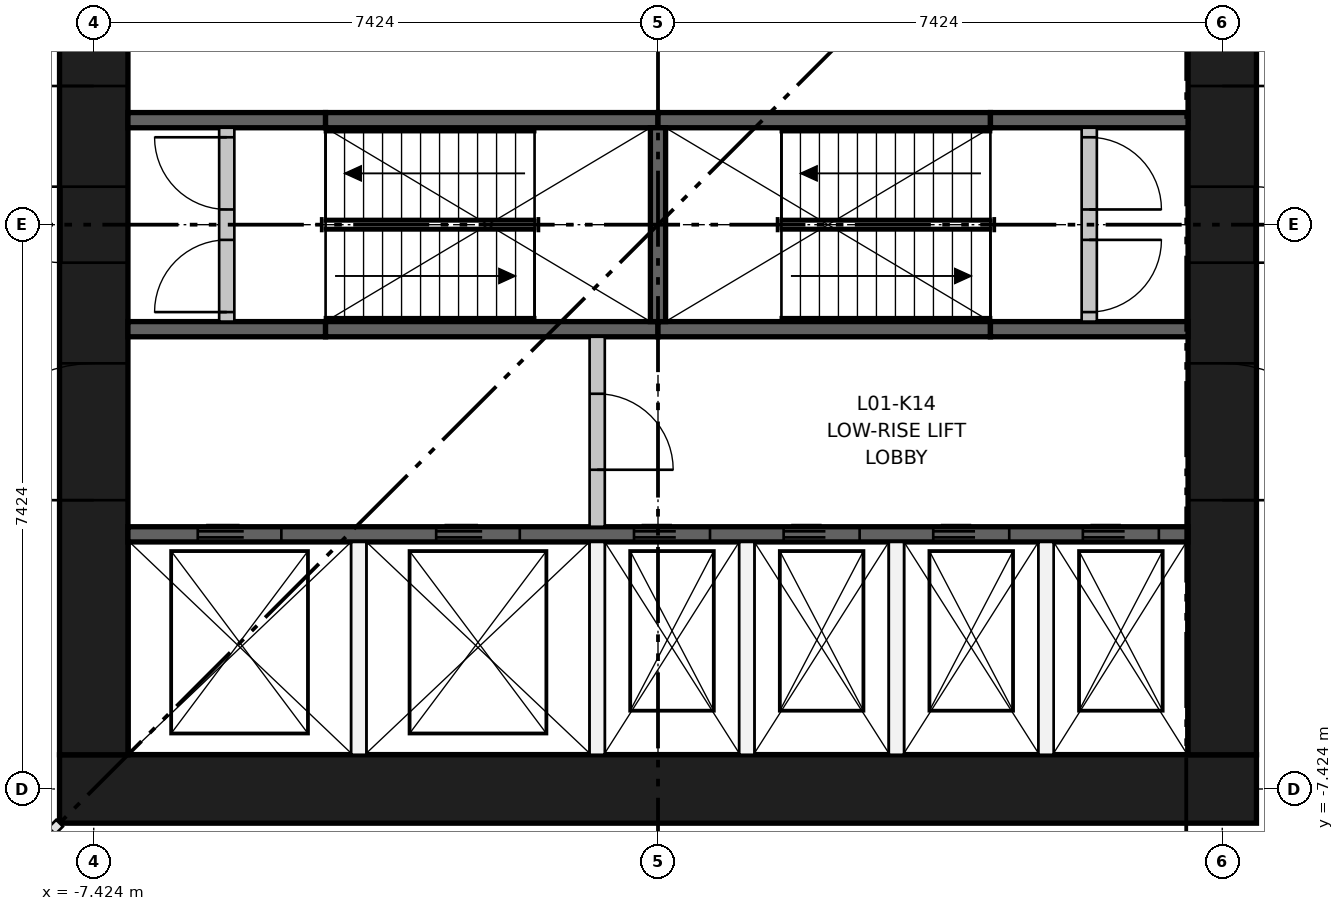
"""IFC4 building model, lengths in metres.
Left out: names, types, materials, properties, quantities, classifications, styles, units other than length and angle.
Written with IfcOpenShell. Run it as: python <this file> out.ifc"""

import sys

from ifc_helpers import new_model, si_unit, direction, frame, frame_2d, origin, place, context, subcontext, project, spatial, rectangle, extrude, element, fill, save


model = new_model("IFC4")
c1 = context("Model", 3, precision=1e-05, world=origin(), true_north=direction((0.0, 1.0)))
c2 = subcontext(c1, "Body", "Model", "MODEL_VIEW")
j1 = project(units=[si_unit("LENGTHUNIT", "METRE"), si_unit("PLANEANGLEUNIT", "RADIAN")], contexts=[c1])
p1 = place(None, origin())
s1 = spatial("IfcSite", under=j1, at=p1, CompositionType="ELEMENT")
p2 = place(p1, origin())
s2 = spatial("IfcBuilding", under=s1, at=p2, CompositionType="ELEMENT")
p3 = place(p2, frame((0.0, 0.0, 5.2)))
s3 = spatial("IfcBuildingStorey", under=s2, at=p3, CompositionType="ELEMENT", Elevation=5.2)
p4 = place(p3, frame((-7.874, -7.424, 0.0), z_axis=(0.0, 0.0, 1.0), x_axis=(1.0, 0.0, 0.0)))
e1 = element("IfcWall", 1, at=p4, inside=s3, PredefinedType="SHEAR", context=c2, shape_type="SweptSolid", body=[
    extrude(rectangle(XDim=15.748, YDim=0.9, at=frame_2d((7.874, 0.0))), origin(), (0.0, 0.0, 1.0), 4.7),
])
p5 = place(p3, frame((-7.424, -6.974, 0.0), z_axis=(0.0, 0.0, 1.0), x_axis=(0.0, 1.0, 0.0)))
e2 = element("IfcWall", 2, at=p5, inside=s3, PredefinedType="SHEAR", context=c2, shape_type="SweptSolid", body=[
    extrude(rectangle(XDim=13.948, YDim=0.9, at=frame_2d((6.974, 0.0))), origin(), (0.0, 0.0, 1.0), 4.7),
])
p6 = place(p5, frame((6.474, 0.0, 0.0)))
e3 = element("IfcOpeningElement", 3, at=p6, cuts=e2, PredefinedType="OPENING", context=c2, shape_type="SweptSolid", body=[
    extrude(rectangle(XDim=1.0, YDim=2.1, at=frame_2d((0.5, 1.05))), frame((0.0, 0.46, 0.0), z_axis=(0.0, -1.0, 0.0), x_axis=(1.0, 0.0, 0.0)), (0.0, 0.0, 1.0), 0.92),
])
p7 = place(p5, frame((3.35, 0.0, 0.0)))
e4 = element("IfcOpeningElement", 4, at=p7, cuts=e2, PredefinedType="OPENING", context=c2, shape_type="SweptSolid", body=[
    extrude(rectangle(XDim=1.8, YDim=2.1, at=frame_2d((0.9, 1.05))), frame((0.0, 0.46, 0.0), z_axis=(0.0, -1.0, 0.0), x_axis=(1.0, 0.0, 0.0)), (0.0, 0.0, 1.0), 0.92),
])
p8 = place(p5, frame((8.799, 0.0, 0.0)))
e5 = element("IfcOpeningElement", 5, at=p8, cuts=e2, PredefinedType="OPENING", context=c2, shape_type="SweptSolid", body=[
    extrude(rectangle(XDim=1.8, YDim=2.1, at=frame_2d((0.9, 1.05))), frame((0.0, 0.46, 0.0), z_axis=(0.0, -1.0, 0.0), x_axis=(1.0, 0.0, 0.0)), (0.0, 0.0, 1.0), 0.92),
])
p9 = place(p5, frame((11.974, 0.0, 0.0)))
e6 = element("IfcOpeningElement", 6, at=p9, cuts=e2, PredefinedType="OPENING", context=c2, shape_type="SweptSolid", body=[
    extrude(rectangle(XDim=1.0, YDim=2.1, at=frame_2d((0.5, 1.05))), frame((0.0, 0.46, 0.0), z_axis=(0.0, -1.0, 0.0), x_axis=(1.0, 0.0, 0.0)), (0.0, 0.0, 1.0), 0.92),
])
p10 = place(p3, frame((7.424, -6.974, 0.0), z_axis=(0.0, 0.0, 1.0), x_axis=(0.0, 1.0, 0.0)))
e7 = element("IfcWall", 7, at=p10, inside=s3, PredefinedType="SHEAR", context=c2, shape_type="SweptSolid", body=[
    extrude(rectangle(XDim=13.948, YDim=0.9, at=frame_2d((6.974, 0.0))), origin(), (0.0, 0.0, 1.0), 4.7),
])
p11 = place(p10, frame((6.474, 0.0, 0.0)))
e8 = element("IfcOpeningElement", 8, at=p11, cuts=e7, PredefinedType="OPENING", context=c2, shape_type="SweptSolid", body=[
    extrude(rectangle(XDim=1.0, YDim=2.1, at=frame_2d((0.5, 1.05))), frame((0.0, 0.46, 0.0), z_axis=(0.0, -1.0, 0.0), x_axis=(1.0, 0.0, 0.0)), (0.0, 0.0, 1.0), 0.92),
])
p12 = place(p10, frame((3.35, 0.0, 0.0)))
e9 = element("IfcOpeningElement", 9, at=p12, cuts=e7, PredefinedType="OPENING", context=c2, shape_type="SweptSolid", body=[
    extrude(rectangle(XDim=1.8, YDim=2.1, at=frame_2d((0.9, 1.05))), frame((0.0, 0.46, 0.0), z_axis=(0.0, -1.0, 0.0), x_axis=(1.0, 0.0, 0.0)), (0.0, 0.0, 1.0), 0.92),
])
p13 = place(p10, frame((8.799, 0.0, 0.0)))
e10 = element("IfcOpeningElement", 10, at=p13, cuts=e7, PredefinedType="OPENING", context=c2, shape_type="SweptSolid", body=[
    extrude(rectangle(XDim=1.8, YDim=2.1, at=frame_2d((0.9, 1.05))), frame((0.0, 0.46, 0.0), z_axis=(0.0, -1.0, 0.0), x_axis=(1.0, 0.0, 0.0)), (0.0, 0.0, 1.0), 0.92),
])
p14 = place(p3, frame((-6.974, -4.074, 0.0), z_axis=(0.0, 0.0, 1.0), x_axis=(1.0, 0.0, 0.0)))
e11 = element("IfcWall", 11, at=p14, inside=s3, PredefinedType="SHEAR", context=c2, shape_type="SweptSolid", body=[
    extrude(rectangle(XDim=13.948, YDim=0.2, at=frame_2d((6.974, 0.0))), origin(), (0.0, 0.0, 1.0), 4.3),
])
p15 = place(p14, frame((0.918, 0.0, 0.0)))
e12 = element("IfcOpeningElement", 12, at=p15, cuts=e11, PredefinedType="OPENING", context=c2, shape_type="SweptSolid", body=[
    extrude(rectangle(XDim=1.1, YDim=2.1, at=frame_2d((0.55, 1.05))), frame((0.0, 0.11, 0.0), z_axis=(0.0, -1.0, 0.0), x_axis=(1.0, 0.0, 0.0)), (0.0, 0.0, 1.0), 0.22),
])
p16 = place(p14, frame((4.055, 0.0, 0.0)))
e13 = element("IfcOpeningElement", 13, at=p16, cuts=e11, PredefinedType="OPENING", context=c2, shape_type="SweptSolid", body=[
    extrude(rectangle(XDim=1.1, YDim=2.1, at=frame_2d((0.55, 1.05))), frame((0.0, 0.11, 0.0), z_axis=(0.0, -1.0, 0.0), x_axis=(1.0, 0.0, 0.0)), (0.0, 0.0, 1.0), 0.22),
])
p17 = place(p14, frame((6.658, 0.0, 0.0)))
e14 = element("IfcOpeningElement", 14, at=p17, cuts=e11, PredefinedType="OPENING", context=c2, shape_type="SweptSolid", body=[
    extrude(rectangle(XDim=1.0, YDim=2.1, at=frame_2d((0.5, 1.05))), frame((0.0, 0.11, 0.0), z_axis=(0.0, -1.0, 0.0), x_axis=(1.0, 0.0, 0.0)), (0.0, 0.0, 1.0), 0.22),
])
p18 = place(p14, frame((8.627, 0.0, 0.0)))
e15 = element("IfcOpeningElement", 15, at=p18, cuts=e11, PredefinedType="OPENING", context=c2, shape_type="SweptSolid", body=[
    extrude(rectangle(XDim=1.0, YDim=2.1, at=frame_2d((0.5, 1.05))), frame((0.0, 0.11, 0.0), z_axis=(0.0, -1.0, 0.0), x_axis=(1.0, 0.0, 0.0)), (0.0, 0.0, 1.0), 0.22),
])
p19 = place(p14, frame((10.595, 0.0, 0.0)))
e16 = element("IfcOpeningElement", 16, at=p19, cuts=e11, PredefinedType="OPENING", context=c2, shape_type="SweptSolid", body=[
    extrude(rectangle(XDim=1.0, YDim=2.1, at=frame_2d((0.5, 1.05))), frame((0.0, 0.11, 0.0), z_axis=(0.0, -1.0, 0.0), x_axis=(1.0, 0.0, 0.0)), (0.0, 0.0, 1.0), 0.22),
])
p20 = place(p14, frame((12.564, 0.0, 0.0)))
e17 = element("IfcOpeningElement", 17, at=p20, cuts=e11, PredefinedType="OPENING", context=c2, shape_type="SweptSolid", body=[
    extrude(rectangle(XDim=1.0, YDim=2.1, at=frame_2d((0.5, 1.05))), frame((0.0, 0.11, 0.0), z_axis=(0.0, -1.0, 0.0), x_axis=(1.0, 0.0, 0.0)), (0.0, 0.0, 1.0), 0.22),
])
p21 = place(p3, frame((-6.974, -1.375, 0.0), z_axis=(0.0, 0.0, 1.0), x_axis=(1.0, 0.0, 0.0)))
e18 = element("IfcWall", 18, at=p21, inside=s3, PredefinedType="SHEAR", context=c2, shape_type="SweptSolid", body=[
    extrude(rectangle(XDim=2.6, YDim=0.2, at=frame_2d((1.3, 0.0))), origin(), (0.0, 0.0, 1.0), 4.3),
])
for number, where, z_axis, x_axis in (
    (19, (-4.374, -1.375, 0.0), (0.0, 0.0, 1.0), (1.0, 0.0, 0.0)),
    (20, (0.0, -1.375, 0.0), (0.0, 0.0, 1.0), (1.0, 0.0, 0.0)),
):
    element("IfcWall", number, at=place(p3, frame(where, z_axis=z_axis, x_axis=x_axis)), inside=s3, PredefinedType="SHEAR", context=c2, shape_type="SweptSolid", body=[
        extrude(rectangle(XDim=4.374, YDim=0.2, at=frame_2d((2.187, 0.0))), origin(), (0.0, 0.0, 1.0), 4.3),
    ])
for number, where, z_axis, x_axis in (
    (21, (4.374, -1.375, 0.0), (0.0, 0.0, 1.0), (1.0, 0.0, 0.0)),
    (22, (-6.974, 1.375, 0.0), (0.0, 0.0, 1.0), (1.0, 0.0, 0.0)),
):
    element("IfcWall", number, at=place(p3, frame(where, z_axis=z_axis, x_axis=x_axis)), inside=s3, PredefinedType="SHEAR", context=c2, shape_type="SweptSolid", body=[
        extrude(rectangle(XDim=2.6, YDim=0.2, at=frame_2d((1.3, 0.0))), origin(), (0.0, 0.0, 1.0), 4.3),
    ])
for number, where, z_axis, x_axis in (
    (23, (-4.374, 1.375, 0.0), (0.0, 0.0, 1.0), (1.0, 0.0, 0.0)),
    (24, (0.0, 1.375, 0.0), (0.0, 0.0, 1.0), (1.0, 0.0, 0.0)),
):
    element("IfcWall", number, at=place(p3, frame(where, z_axis=z_axis, x_axis=x_axis)), inside=s3, PredefinedType="SHEAR", context=c2, shape_type="SweptSolid", body=[
        extrude(rectangle(XDim=4.374, YDim=0.2, at=frame_2d((2.187, 0.0))), origin(), (0.0, 0.0, 1.0), 4.3),
    ])
p22 = place(p3, frame((4.374, 1.375, 0.0), z_axis=(0.0, 0.0, 1.0), x_axis=(1.0, 0.0, 0.0)))
e25 = element("IfcWall", 25, at=p22, inside=s3, PredefinedType="SHEAR", context=c2, shape_type="SweptSolid", body=[
    extrude(rectangle(XDim=2.6, YDim=0.2, at=frame_2d((1.3, 0.0))), origin(), (0.0, 0.0, 1.0), 4.3),
])
p23 = place(p3, frame((0.0, -1.275, 0.0), z_axis=(0.0, 0.0, 1.0), x_axis=(0.0, 1.0, 0.0)))
e26 = element("IfcWall", 26, at=p23, inside=s3, PredefinedType="SHEAR", context=c2, shape_type="SweptSolid", body=[
    extrude(rectangle(XDim=2.55, YDim=0.2, at=frame_2d((1.275, 0.0))), origin(), (0.0, 0.0, 1.0), 4.3),
])
for number, where, z_axis, x_axis in (
    (27, (-3.937, -6.974, 0.0), (0.0, 0.0, 1.0), (0.0, 1.0, 0.0)),
    (28, (-0.8, -6.974, 0.0), (0.0, 0.0, 1.0), (0.0, 1.0, 0.0)),
):
    element("IfcWall", number, at=place(p3, frame(where, z_axis=z_axis, x_axis=x_axis)), inside=s3, PredefinedType="PARTITIONING", context=c2, shape_type="SweptSolid", body=[
        extrude(rectangle(XDim=2.8, YDim=0.2, at=frame_2d((1.4, 0.0))), origin(), (0.0, 0.0, 1.0), 4.3),
    ])
p24 = place(p3, frame((-0.8, -3.974, 0.0), z_axis=(0.0, 0.0, 1.0), x_axis=(0.0, 1.0, 0.0)))
e29 = element("IfcWall", 29, at=p24, inside=s3, PredefinedType="PARTITIONING", context=c2, shape_type="SweptSolid", body=[
    extrude(rectangle(XDim=2.499, YDim=0.2, at=frame_2d((1.25, 0.0))), origin(), (0.0, 0.0, 1.0), 4.3),
])
p25 = place(p24, frame((0.75, 0.0, 0.0)))
e30 = element("IfcOpeningElement", 30, at=p25, cuts=e29, PredefinedType="OPENING", context=c2, shape_type="SweptSolid", body=[
    extrude(rectangle(XDim=1.0, YDim=2.1, at=frame_2d((0.5, 1.05))), frame((0.0, 0.11, 0.0), z_axis=(0.0, -1.0, 0.0), x_axis=(1.0, 0.0, 0.0)), (0.0, 0.0, 1.0), 0.22),
])
for number, where, z_axis, x_axis in (
    (31, (1.168, -6.974, 0.0), (0.0, 0.0, 1.0), (0.0, 1.0, 0.0)),
    (32, (3.137, -6.974, 0.0), (0.0, 0.0, 1.0), (0.0, 1.0, 0.0)),
    (33, (5.105, -6.974, 0.0), (0.0, 0.0, 1.0), (0.0, 1.0, 0.0)),
):
    element("IfcWall", number, at=place(p3, frame(where, z_axis=z_axis, x_axis=x_axis)), inside=s3, PredefinedType="PARTITIONING", context=c2, shape_type="SweptSolid", body=[
        extrude(rectangle(XDim=2.8, YDim=0.2, at=frame_2d((1.4, 0.0))), origin(), (0.0, 0.0, 1.0), 4.3),
    ])
p26 = place(p3, frame((-5.674, -1.275, 0.0), z_axis=(0.0, 0.0, 1.0), x_axis=(0.0, 1.0, 0.0)))
e34 = element("IfcWall", 34, at=p26, inside=s3, PredefinedType="PARTITIONING", context=c2, shape_type="SweptSolid", body=[
    extrude(rectangle(XDim=2.55, YDim=0.2, at=frame_2d((1.275, 0.0))), origin(), (0.0, 0.0, 1.0), 4.3),
])
p27 = place(p26, frame((0.125, 0.0, 0.0)))
e35 = element("IfcOpeningElement", 35, at=p27, cuts=e34, PredefinedType="OPENING", context=c2, shape_type="SweptSolid", body=[
    extrude(rectangle(XDim=0.95, YDim=2.1, at=frame_2d((0.475, 1.05))), frame((0.0, 0.11, 0.0), z_axis=(0.0, -1.0, 0.0), x_axis=(1.0, 0.0, 0.0)), (0.0, 0.0, 1.0), 0.22),
])
p28 = place(p26, frame((1.475, 0.0, 0.0)))
e36 = element("IfcOpeningElement", 36, at=p28, cuts=e34, PredefinedType="OPENING", context=c2, shape_type="SweptSolid", body=[
    extrude(rectangle(XDim=0.95, YDim=2.1, at=frame_2d((0.475, 1.05))), frame((0.0, 0.11, 0.0), z_axis=(0.0, -1.0, 0.0), x_axis=(1.0, 0.0, 0.0)), (0.0, 0.0, 1.0), 0.22),
])
p29 = place(p3, frame((5.674, -1.275, 0.0), z_axis=(0.0, 0.0, 1.0), x_axis=(0.0, 1.0, 0.0)))
e37 = element("IfcWall", 37, at=p29, inside=s3, PredefinedType="PARTITIONING", context=c2, shape_type="SweptSolid", body=[
    extrude(rectangle(XDim=2.55, YDim=0.2, at=frame_2d((1.275, 0.0))), origin(), (0.0, 0.0, 1.0), 4.3),
])
p30 = place(p29, frame((0.125, 0.0, 0.0)))
e38 = element("IfcOpeningElement", 38, at=p30, cuts=e37, PredefinedType="OPENING", context=c2, shape_type="SweptSolid", body=[
    extrude(rectangle(XDim=0.95, YDim=2.1, at=frame_2d((0.475, 1.05))), frame((0.0, 0.11, 0.0), z_axis=(0.0, -1.0, 0.0), x_axis=(1.0, 0.0, 0.0)), (0.0, 0.0, 1.0), 0.22),
])
p31 = place(p29, frame((1.475, 0.0, 0.0)))
e39 = element("IfcOpeningElement", 39, at=p31, cuts=e37, PredefinedType="OPENING", context=c2, shape_type="SweptSolid", body=[
    extrude(rectangle(XDim=0.95, YDim=2.1, at=frame_2d((0.475, 1.05))), frame((0.0, 0.11, 0.0), z_axis=(0.0, -1.0, 0.0), x_axis=(1.0, 0.0, 0.0)), (0.0, 0.0, 1.0), 0.22),
])
p32 = place(p3, frame((-7.874, -7.874, 0.0), z_axis=(0.0, 0.0, 1.0), x_axis=(-0.707106781187, -0.707106781187, 0.0)))
e40 = element("IfcWall", 40, at=p32, inside=s3, PredefinedType="PARTITIONING", context=c2, shape_type="SweptSolid", body=[
    extrude(rectangle(XDim=2.165, YDim=0.125, at=frame_2d((1.082, 0.0))), origin(), (0.0, 0.0, 1.0), 4.3),
])
p33 = place(p32, frame((0.6, 0.0, 0.0)))
e41 = element("IfcOpeningElement", 41, at=p33, cuts=e40, PredefinedType="OPENING", context=c2, shape_type="SweptSolid", body=[
    extrude(rectangle(XDim=1.0, YDim=2.1, at=frame_2d((0.5, 1.05))), frame((0.0, 0.073, 0.0), z_axis=(0.0, -1.0, 0.0), x_axis=(1.0, 0.0, 0.0)), (0.0, 0.0, 1.0), 0.145),
])
p34 = place(p15, origin())
e42 = element("IfcDoor", 42, at=p34, inside=s3, OperationType="DOUBLE_DOOR_SLIDING", PredefinedType="DOOR", context=c2, shape_type="SweptSolid", body=[
    extrude(rectangle(XDim=1.1, YDim=2.1, at=frame_2d((0.55, 1.05))), frame((0.0, 0.025, 0.0), z_axis=(0.0, -1.0, 0.0), x_axis=(1.0, 0.0, 0.0)), (0.0, 0.0, 1.0), 0.05),
])
fill(e12, e42)
p35 = place(p16, origin())
e43 = element("IfcDoor", 43, at=p35, inside=s3, OperationType="DOUBLE_DOOR_SLIDING", PredefinedType="DOOR", context=c2, shape_type="SweptSolid", body=[
    extrude(rectangle(XDim=1.1, YDim=2.1, at=frame_2d((0.55, 1.05))), frame((0.0, 0.025, 0.0), z_axis=(0.0, -1.0, 0.0), x_axis=(1.0, 0.0, 0.0)), (0.0, 0.0, 1.0), 0.05),
])
fill(e13, e43)
p36 = place(p17, origin())
e44 = element("IfcDoor", 44, at=p36, inside=s3, OperationType="DOUBLE_DOOR_SLIDING", PredefinedType="DOOR", context=c2, shape_type="SweptSolid", body=[
    extrude(rectangle(XDim=1.0, YDim=2.1, at=frame_2d((0.5, 1.05))), frame((0.0, 0.025, 0.0), z_axis=(0.0, -1.0, 0.0), x_axis=(1.0, 0.0, 0.0)), (0.0, 0.0, 1.0), 0.05),
])
fill(e14, e44)
p37 = place(p18, origin())
e45 = element("IfcDoor", 45, at=p37, inside=s3, OperationType="DOUBLE_DOOR_SLIDING", PredefinedType="DOOR", context=c2, shape_type="SweptSolid", body=[
    extrude(rectangle(XDim=1.0, YDim=2.1, at=frame_2d((0.5, 1.05))), frame((0.0, 0.025, 0.0), z_axis=(0.0, -1.0, 0.0), x_axis=(1.0, 0.0, 0.0)), (0.0, 0.0, 1.0), 0.05),
])
fill(e15, e45)
p38 = place(p19, origin())
e46 = element("IfcDoor", 46, at=p38, inside=s3, OperationType="DOUBLE_DOOR_SLIDING", PredefinedType="DOOR", context=c2, shape_type="SweptSolid", body=[
    extrude(rectangle(XDim=1.0, YDim=2.1, at=frame_2d((0.5, 1.05))), frame((0.0, 0.025, 0.0), z_axis=(0.0, -1.0, 0.0), x_axis=(1.0, 0.0, 0.0)), (0.0, 0.0, 1.0), 0.05),
])
fill(e16, e46)
p39 = place(p20, origin())
e47 = element("IfcDoor", 47, at=p39, inside=s3, OperationType="DOUBLE_DOOR_SLIDING", PredefinedType="DOOR", context=c2, shape_type="SweptSolid", body=[
    extrude(rectangle(XDim=1.0, YDim=2.1, at=frame_2d((0.5, 1.05))), frame((0.0, 0.025, 0.0), z_axis=(0.0, -1.0, 0.0), x_axis=(1.0, 0.0, 0.0)), (0.0, 0.0, 1.0), 0.05),
])
fill(e17, e47)
p40 = place(p27, origin())
e48 = element("IfcDoor", 48, at=p40, inside=s3, OperationType="SINGLE_SWING_LEFT", PredefinedType="DOOR", context=c2, shape_type="SweptSolid", body=[
    extrude(rectangle(XDim=0.95, YDim=2.1, at=frame_2d((0.475, 1.05))), frame((0.0, 0.025, 0.0), z_axis=(0.0, -1.0, 0.0), x_axis=(1.0, 0.0, 0.0)), (0.0, 0.0, 1.0), 0.05),
])
fill(e35, e48)
p41 = place(p28, origin())
e49 = element("IfcDoor", 49, at=p41, inside=s3, OperationType="SINGLE_SWING_RIGHT", PredefinedType="DOOR", context=c2, shape_type="SweptSolid", body=[
    extrude(rectangle(XDim=0.95, YDim=2.1, at=frame_2d((0.475, 1.05))), frame((0.0, 0.025, 0.0), z_axis=(0.0, -1.0, 0.0), x_axis=(1.0, 0.0, 0.0)), (0.0, 0.0, 1.0), 0.05),
])
fill(e36, e49)
p42 = place(p30, frame((0.95, 0.0, 0.0), z_axis=(0.0, 0.0, 1.0), x_axis=(-1.0, 0.0, 0.0)))
e50 = element("IfcDoor", 50, at=p42, inside=s3, OperationType="SINGLE_SWING_RIGHT", PredefinedType="DOOR", context=c2, shape_type="SweptSolid", body=[
    extrude(rectangle(XDim=0.95, YDim=2.1, at=frame_2d((0.475, 1.05))), frame((0.0, 0.025, 0.0), z_axis=(0.0, -1.0, 0.0), x_axis=(1.0, 0.0, 0.0)), (0.0, 0.0, 1.0), 0.05),
])
fill(e38, e50)
p43 = place(p31, frame((0.95, 0.0, 0.0), z_axis=(0.0, 0.0, 1.0), x_axis=(-1.0, 0.0, 0.0)))
e51 = element("IfcDoor", 51, at=p43, inside=s3, OperationType="SINGLE_SWING_LEFT", PredefinedType="DOOR", context=c2, shape_type="SweptSolid", body=[
    extrude(rectangle(XDim=0.95, YDim=2.1, at=frame_2d((0.475, 1.05))), frame((0.0, 0.025, 0.0), z_axis=(0.0, -1.0, 0.0), x_axis=(1.0, 0.0, 0.0)), (0.0, 0.0, 1.0), 0.05),
])
fill(e39, e51)
p44 = place(p25, frame((1.0, 0.0, 0.0), z_axis=(0.0, 0.0, 1.0), x_axis=(-1.0, 0.0, 0.0)))
e52 = element("IfcDoor", 52, at=p44, inside=s3, OperationType="SINGLE_SWING_LEFT", PredefinedType="DOOR", context=c2, shape_type="SweptSolid", body=[
    extrude(rectangle(XDim=1.0, YDim=2.1, at=frame_2d((0.5, 1.05))), frame((0.0, 0.025, 0.0), z_axis=(0.0, -1.0, 0.0), x_axis=(1.0, 0.0, 0.0)), (0.0, 0.0, 1.0), 0.05),
])
fill(e30, e52)
p45 = place(p6, origin())
e53 = element("IfcDoor", 53, at=p45, inside=s3, OperationType="SINGLE_SWING_RIGHT", PredefinedType="DOOR", context=c2, shape_type="SweptSolid", body=[
    extrude(rectangle(XDim=1.0, YDim=2.1, at=frame_2d((0.5, 1.05))), frame((0.0, 0.45, 0.0), z_axis=(0.0, -1.0, 0.0), x_axis=(1.0, 0.0, 0.0)), (0.0, 0.0, 1.0), 0.05),
])
fill(e3, e53)
p46 = place(p7, origin())
e54 = element("IfcDoor", 54, at=p46, inside=s3, OperationType="DOUBLE_DOOR_SINGLE_SWING", PredefinedType="DOOR", context=c2, shape_type="SweptSolid", body=[
    extrude(rectangle(XDim=1.8, YDim=2.1, at=frame_2d((0.9, 1.05))), frame((0.0, 0.025, 0.0), z_axis=(0.0, -1.0, 0.0), x_axis=(1.0, 0.0, 0.0)), (0.0, 0.0, 1.0), 0.05),
])
fill(e4, e54)
p47 = place(p8, origin())
e55 = element("IfcDoor", 55, at=p47, inside=s3, OperationType="DOUBLE_DOOR_SINGLE_SWING", PredefinedType="DOOR", context=c2, shape_type="SweptSolid", body=[
    extrude(rectangle(XDim=1.8, YDim=2.1, at=frame_2d((0.9, 1.05))), frame((0.0, 0.025, 0.0), z_axis=(0.0, -1.0, 0.0), x_axis=(1.0, 0.0, 0.0)), (0.0, 0.0, 1.0), 0.05),
])
fill(e5, e55)
p48 = place(p11, frame((1.0, 0.0, 0.0), z_axis=(0.0, 0.0, 1.0), x_axis=(-1.0, 0.0, 0.0)))
e56 = element("IfcDoor", 56, at=p48, inside=s3, OperationType="SINGLE_SWING_LEFT", PredefinedType="DOOR", context=c2, shape_type="SweptSolid", body=[
    extrude(rectangle(XDim=1.0, YDim=2.1, at=frame_2d((0.5, 1.05))), frame((0.0, 0.45, 0.0), z_axis=(0.0, -1.0, 0.0), x_axis=(1.0, 0.0, 0.0)), (0.0, 0.0, 1.0), 0.05),
])
fill(e8, e56)
p49 = place(p12, frame((1.8, 0.0, 0.0), z_axis=(0.0, 0.0, 1.0), x_axis=(-1.0, 0.0, 0.0)))
e57 = element("IfcDoor", 57, at=p49, inside=s3, OperationType="DOUBLE_DOOR_SINGLE_SWING", PredefinedType="DOOR", context=c2, shape_type="SweptSolid", body=[
    extrude(rectangle(XDim=1.8, YDim=2.1, at=frame_2d((0.9, 1.05))), frame((0.0, 0.025, 0.0), z_axis=(0.0, -1.0, 0.0), x_axis=(1.0, 0.0, 0.0)), (0.0, 0.0, 1.0), 0.05),
])
fill(e9, e57)
p50 = place(p13, frame((1.8, 0.0, 0.0), z_axis=(0.0, 0.0, 1.0), x_axis=(-1.0, 0.0, 0.0)))
e58 = element("IfcDoor", 58, at=p50, inside=s3, OperationType="DOUBLE_DOOR_SINGLE_SWING", PredefinedType="DOOR", context=c2, shape_type="SweptSolid", body=[
    extrude(rectangle(XDim=1.8, YDim=2.1, at=frame_2d((0.9, 1.05))), frame((0.0, 0.025, 0.0), z_axis=(0.0, -1.0, 0.0), x_axis=(1.0, 0.0, 0.0)), (0.0, 0.0, 1.0), 0.05),
])
fill(e10, e58)
save(model, sys.argv[1])
